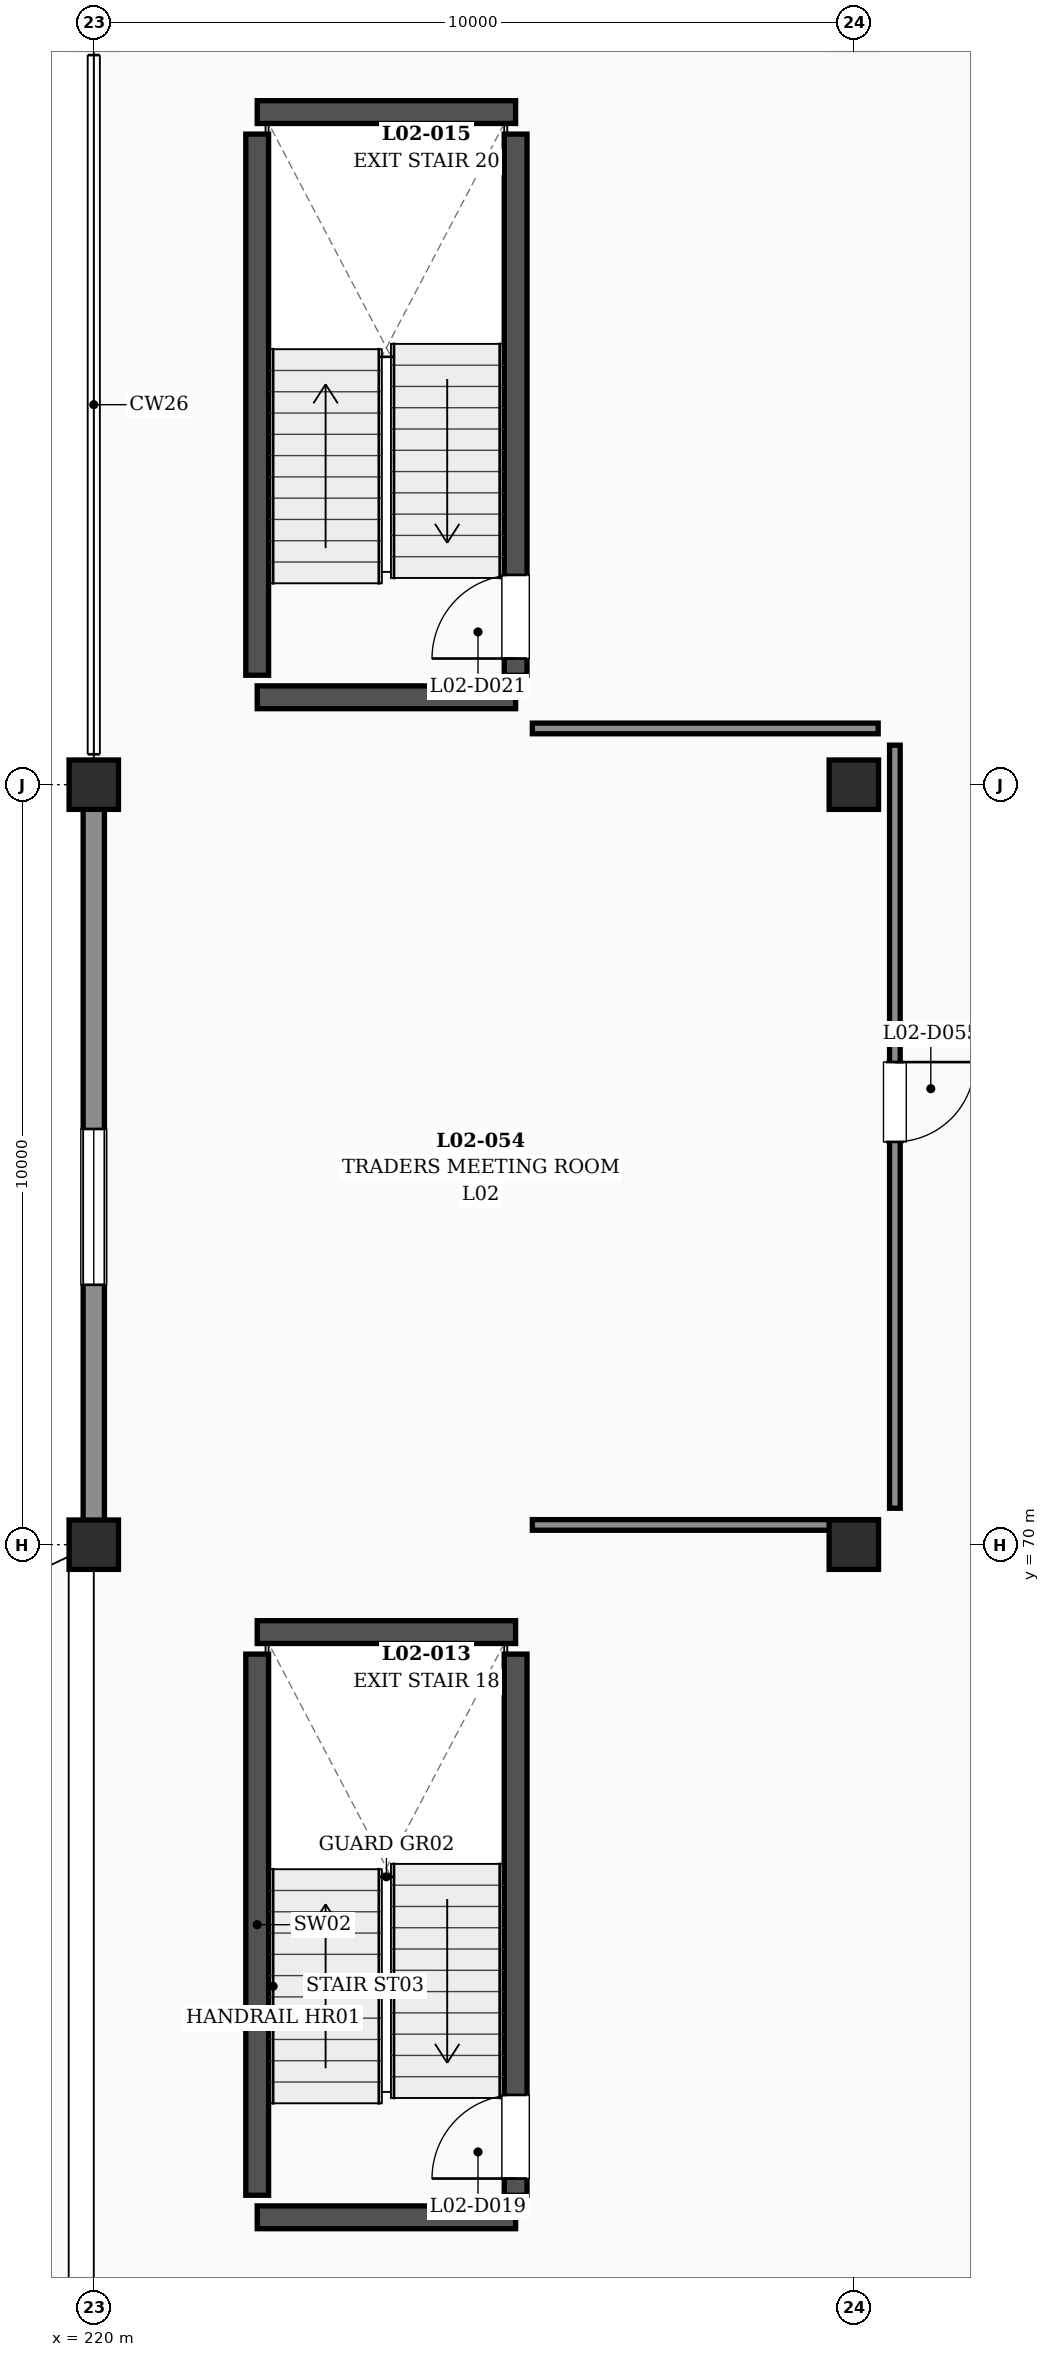
"""IFC4 building model, lengths in metres.
Left out: names, types, materials, properties, quantities, classifications, styles, units other than length and angle.
Written with IfcOpenShell. Run it as: python <this file> out.ifc"""

import sys

from ifc_helpers import new_model, si_unit, direction, frame, frame_2d, origin, origin_2d, place, context, subcontext, project, spatial, rectangle, extrude, element, fill, save


model = new_model("IFC4")
c1 = context("Model", 3, precision=1e-05, world=origin(), true_north=direction((0.0, 1.0)))
c2 = subcontext(c1, "Body", "Model", "MODEL_VIEW")
j1 = project(units=[si_unit("LENGTHUNIT", "METRE"), si_unit("PLANEANGLEUNIT", "RADIAN")], contexts=[c1])
p1 = place(None, origin())
s1 = spatial("IfcSite", under=j1, at=p1, CompositionType="ELEMENT")
p2 = place(p1, origin())
s2 = spatial("IfcBuilding", under=s1, at=p2, CompositionType="ELEMENT")
p3 = place(p2, frame((0.0, 0.0, 10.8)))
s3 = spatial("IfcBuildingStorey", under=s2, at=p3, CompositionType="ELEMENT", Elevation=10.8)
for number, where, z_axis, x_axis in (
    (1, (220.0, 70.0, 0.0), (0.0, 0.0, 1.0), (1.0, 0.0, 0.0)),
    (2, (220.0, 80.0, 0.0), (0.0, 0.0, 1.0), (1.0, 0.0, 0.0)),
    (3, (230.0, 70.0, 0.0), (0.0, 0.0, 1.0), (1.0, 0.0, 0.0)),
    (4, (230.0, 80.0, 0.0), (0.0, 0.0, 1.0), (1.0, 0.0, 0.0)),
):
    element("IfcColumn", number, at=place(p3, frame(where, z_axis=z_axis, x_axis=x_axis)), inside=s3, PredefinedType="COLUMN", context=c2, shape_type="SweptSolid", body=[
        extrude(rectangle(XDim=0.65, YDim=0.65, at=origin_2d()), origin(), (0.0, 0.0, 1.0), 4.2),
    ])
p4 = place(p3, frame((220.0, 70.22, 0.0), z_axis=(0.0, 0.0, 1.0), x_axis=(0.0, 1.0, 0.0)))
e5 = element("IfcWall", 5, at=p4, inside=s3, PredefinedType="SOLIDWALL", context=c2, shape_type="SweptSolid", body=[
    extrude(rectangle(XDim=9.56, YDim=0.28, at=frame_2d((4.78, 0.0))), origin(), (0.0, 0.0, 1.0), 3.16),
])
p5 = place(p4, frame((3.2, 0.0, 0.95)))
e6 = element("IfcOpeningElement", 6, at=p5, cuts=e5, PredefinedType="OPENING", context=c2, shape_type="SweptSolid", body=[
    extrude(rectangle(XDim=2.05, YDim=1.85, at=frame_2d((1.025, 0.925))), frame((0.0, 0.15, 0.0), z_axis=(0.0, -1.0, 0.0), x_axis=(1.0, 0.0, 0.0)), (0.0, 0.0, 1.0), 0.3),
])
for number, where, z_axis, x_axis in (
    (7, (222.15, 61.15, 0.0), (0.0, 0.0, 1.0), (1.0, 0.0, 0.0)),
    (8, (222.15, 68.85, 0.0), (0.0, 0.0, 1.0), (1.0, 0.0, 0.0)),
):
    element("IfcWall", number, at=place(p3, frame(where, z_axis=z_axis, x_axis=x_axis)), inside=s3, PredefinedType="SHEAR", context=c2, shape_type="SweptSolid", body=[
        extrude(rectangle(XDim=3.4, YDim=0.3, at=frame_2d((1.7, 0.0))), origin(), (0.0, 0.0, 1.0), 4.2),
    ])
p6 = place(p3, frame((222.15, 61.44, 0.0), z_axis=(0.0, 0.0, 1.0), x_axis=(0.0, 1.0, 0.0)))
e9 = element("IfcWall", 9, at=p6, inside=s3, PredefinedType="SHEAR", context=c2, shape_type="SweptSolid", body=[
    extrude(rectangle(XDim=7.12, YDim=0.3, at=frame_2d((3.56, 0.0))), origin(), (0.0, 0.0, 1.0), 4.2),
])
p7 = place(p3, frame((225.55, 61.44, 0.0), z_axis=(0.0, 0.0, 1.0), x_axis=(0.0, 1.0, 0.0)))
e10 = element("IfcWall", 10, at=p7, inside=s3, PredefinedType="SHEAR", context=c2, shape_type="SweptSolid", body=[
    extrude(rectangle(XDim=7.12, YDim=0.3, at=frame_2d((3.56, 0.0))), origin(), (0.0, 0.0, 1.0), 4.2),
])
p8 = place(p7, frame((0.22, 0.0, 0.0)))
e11 = element("IfcOpeningElement", 11, at=p8, cuts=e10, PredefinedType="OPENING", context=c2, shape_type="SweptSolid", body=[
    extrude(rectangle(XDim=1.1, YDim=2.2, at=frame_2d((0.55, 1.1))), frame((0.0, 0.16, 0.0), z_axis=(0.0, -1.0, 0.0), x_axis=(1.0, 0.0, 0.0)), (0.0, 0.0, 1.0), 0.32),
])
for number, where, z_axis, x_axis in (
    (12, (222.15, 81.15, 0.0), (0.0, 0.0, 1.0), (1.0, 0.0, 0.0)),
    (13, (222.15, 88.85, 0.0), (0.0, 0.0, 1.0), (1.0, 0.0, 0.0)),
):
    element("IfcWall", number, at=place(p3, frame(where, z_axis=z_axis, x_axis=x_axis)), inside=s3, PredefinedType="SHEAR", context=c2, shape_type="SweptSolid", body=[
        extrude(rectangle(XDim=3.4, YDim=0.3, at=frame_2d((1.7, 0.0))), origin(), (0.0, 0.0, 1.0), 4.2),
    ])
p9 = place(p3, frame((222.15, 81.44, 0.0), z_axis=(0.0, 0.0, 1.0), x_axis=(0.0, 1.0, 0.0)))
e14 = element("IfcWall", 14, at=p9, inside=s3, PredefinedType="SHEAR", context=c2, shape_type="SweptSolid", body=[
    extrude(rectangle(XDim=7.12, YDim=0.3, at=frame_2d((3.56, 0.0))), origin(), (0.0, 0.0, 1.0), 4.2),
])
p10 = place(p3, frame((225.55, 81.44, 0.0), z_axis=(0.0, 0.0, 1.0), x_axis=(0.0, 1.0, 0.0)))
e15 = element("IfcWall", 15, at=p10, inside=s3, PredefinedType="SHEAR", context=c2, shape_type="SweptSolid", body=[
    extrude(rectangle(XDim=7.12, YDim=0.3, at=frame_2d((3.56, 0.0))), origin(), (0.0, 0.0, 1.0), 4.2),
])
p11 = place(p10, frame((0.22, 0.0, 0.0)))
e16 = element("IfcOpeningElement", 16, at=p11, cuts=e15, PredefinedType="OPENING", context=c2, shape_type="SweptSolid", body=[
    extrude(rectangle(XDim=1.1, YDim=2.2, at=frame_2d((0.55, 1.1))), frame((0.0, 0.16, 0.0), z_axis=(0.0, -1.0, 0.0), x_axis=(1.0, 0.0, 0.0)), (0.0, 0.0, 1.0), 0.32),
])
p12 = place(p3, frame((225.77, 80.74, 0.0), z_axis=(0.0, 0.0, 1.0), x_axis=(1.0, 0.0, 0.0)))
e17 = element("IfcWall", 17, at=p12, inside=s3, PredefinedType="PARTITIONING", context=c2, shape_type="SweptSolid", body=[
    extrude(rectangle(XDim=4.55, YDim=0.14, at=frame_2d((2.275, 0.0))), origin(), (0.0, 0.0, 1.0), 3.86),
])
p13 = place(p3, frame((230.54, 80.52, 0.0), z_axis=(0.0, 0.0, 1.0), x_axis=(0.0, -1.0, 0.0)))
e18 = element("IfcWall", 18, at=p13, inside=s3, PredefinedType="PARTITIONING", context=c2, shape_type="SweptSolid", body=[
    extrude(rectangle(XDim=10.04, YDim=0.14, at=frame_2d((5.02, 0.0))), origin(), (0.0, 0.0, 1.0), 3.86),
])
p14 = place(p13, frame((4.17, 0.0, 0.0)))
e19 = element("IfcOpeningElement", 19, at=p14, cuts=e18, PredefinedType="OPENING", context=c2, shape_type="SweptSolid", body=[
    extrude(rectangle(XDim=1.05, YDim=2.25, at=frame_2d((0.525, 1.125))), frame((0.0, 0.08, 0.0), z_axis=(0.0, -1.0, 0.0), x_axis=(1.0, 0.0, 0.0)), (0.0, 0.0, 1.0), 0.16),
])
p15 = place(p3, frame((230.32, 70.26, 0.0), z_axis=(0.0, 0.0, 1.0), x_axis=(-1.0, 0.0, 0.0)))
e20 = element("IfcWall", 20, at=p15, inside=s3, PredefinedType="PARTITIONING", context=c2, shape_type="SweptSolid", body=[
    extrude(rectangle(XDim=4.55, YDim=0.14, at=frame_2d((2.275, 0.0))), origin(), (0.0, 0.0, 1.0), 3.11),
])
p16 = place(p5, origin())
e21 = element("IfcWindow", 21, at=p16, inside=s3, PartitioningType="SINGLE_PANEL", PredefinedType="WINDOW", context=c2, shape_type="SweptSolid", body=[
    extrude(rectangle(XDim=2.05, YDim=1.85, at=frame_2d((1.025, 0.925))), frame((0.0, 0.03, 0.0), z_axis=(0.0, -1.0, 0.0), x_axis=(1.0, 0.0, 0.0)), (0.0, 0.0, 1.0), 0.06),
])
fill(e6, e21)
p17 = place(p8, origin())
e22 = element("IfcDoor", 22, at=p17, inside=s3, OperationType="SINGLE_SWING_LEFT", PredefinedType="DOOR", context=c2, shape_type="SweptSolid", body=[
    extrude(rectangle(XDim=1.1, YDim=2.2, at=frame_2d((0.55, 1.1))), frame((0.0, 0.025, 0.0), z_axis=(0.0, -1.0, 0.0), x_axis=(1.0, 0.0, 0.0)), (0.0, 0.0, 1.0), 0.05),
])
fill(e11, e22)
p18 = place(p11, origin())
e23 = element("IfcDoor", 23, at=p18, inside=s3, OperationType="SINGLE_SWING_LEFT", PredefinedType="DOOR", context=c2, shape_type="SweptSolid", body=[
    extrude(rectangle(XDim=1.1, YDim=2.2, at=frame_2d((0.55, 1.1))), frame((0.0, 0.025, 0.0), z_axis=(0.0, -1.0, 0.0), x_axis=(1.0, 0.0, 0.0)), (0.0, 0.0, 1.0), 0.05),
])
fill(e16, e23)
p19 = place(p14, origin())
e24 = element("IfcDoor", 24, at=p19, inside=s3, OperationType="SINGLE_SWING_LEFT", PredefinedType="DOOR", context=c2, shape_type="SweptSolid", body=[
    extrude(rectangle(XDim=1.05, YDim=2.25, at=frame_2d((0.525, 1.125))), frame((0.0, 0.025, 0.0), z_axis=(0.0, -1.0, 0.0), x_axis=(1.0, 0.0, 0.0)), (0.0, 0.0, 1.0), 0.05),
])
fill(e19, e24)
save(model, sys.argv[1])
